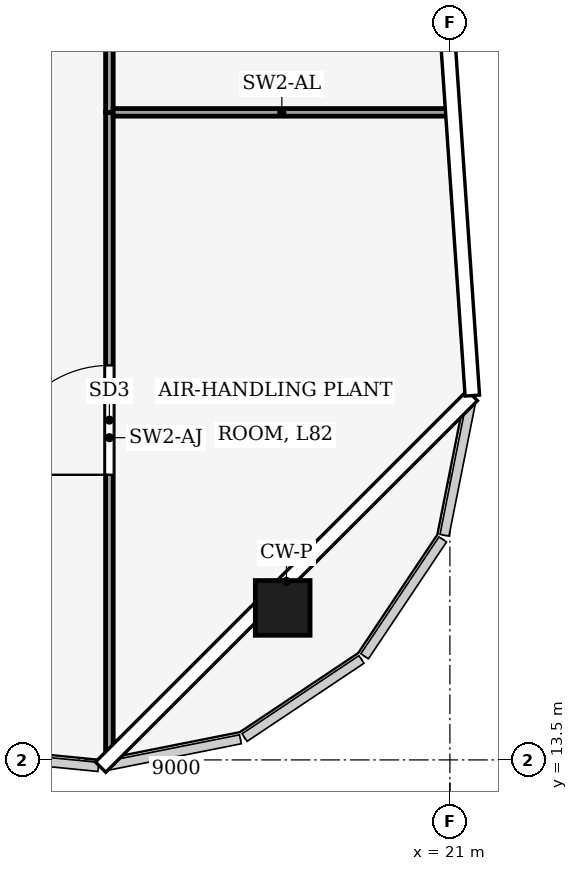
"""IFC4 building model, lengths in metres.
Left out: names, types, materials, properties, quantities, classifications, styles, units other than length and angle.
Written with IfcOpenShell. Run it as: python <this file> out.ifc"""

import sys

from ifc_helpers import new_model, si_unit, direction, frame, frame_2d, origin, origin_2d, place, context, subcontext, project, spatial, rectangle, hollow_rectangle, extrude, element, fill, save


model = new_model("IFC4")
c1 = context("Model", 3, precision=1e-05, world=origin(), true_north=direction((0.0, 1.0)))
c2 = subcontext(c1, "Body", "Model", "MODEL_VIEW")
j1 = project(units=[si_unit("LENGTHUNIT", "METRE"), si_unit("PLANEANGLEUNIT", "RADIAN")], contexts=[c1])
p1 = place(None, origin())
s1 = spatial("IfcSite", under=j1, at=p1, CompositionType="ELEMENT")
p2 = place(p1, origin())
s2 = spatial("IfcBuilding", under=s1, at=p2, CompositionType="ELEMENT")
p3 = place(p2, frame((0.0, 0.0, 364.0)))
s3 = spatial("IfcBuildingStorey", under=s2, at=p3, CompositionType="ELEMENT", Elevation=364.0)
p4 = place(p3, frame((18.25, 16.0, 0.0), z_axis=(0.0, 0.0, 1.0), x_axis=(1.0, 0.0, 0.0)))
e1 = element("IfcColumn", 1, at=p4, inside=s3, PredefinedType="COLUMN", context=c2, shape_type="SweptSolid", body=[
    extrude(hollow_rectangle(XDim=0.9, YDim=0.9, WallThickness=0.04, at=origin_2d()), origin(), (0.0, 0.0, 1.0), 4.0),
])
p5 = place(p3, frame((15.4, 13.45, 0.0), z_axis=(0.0, 0.0, 1.0), x_axis=(0.0, 1.0, 0.0)))
e2 = element("IfcWall", 2, at=p5, inside=s3, PredefinedType="PARTITIONING", context=c2, shape_type="SweptSolid", body=[
    extrude(rectangle(XDim=10.7, YDim=0.125, at=frame_2d((5.35, 0.0))), origin(), (0.0, 0.0, 1.0), 2.812),
])
p6 = place(p5, frame((4.739, 0.0, 0.0)))
e3 = element("IfcOpeningElement", 3, at=p6, cuts=e2, PredefinedType="OPENING", context=c2, shape_type="SweptSolid", body=[
    extrude(rectangle(XDim=1.8, YDim=2.4, at=frame_2d((0.9, 1.2))), frame((0.0, 0.073, 0.0), z_axis=(0.0, -1.0, 0.0), x_axis=(1.0, 0.0, 0.0)), (0.0, 0.0, 1.0), 0.145),
])
p7 = place(p3, frame((15.4, 24.15, 0.0), z_axis=(0.0, 0.0, 1.0), x_axis=(0.0, 1.0, 0.0)))
e4 = element("IfcWall", 4, at=p7, inside=s3, PredefinedType="PARTITIONING", context=c2, shape_type="SweptSolid", body=[
    extrude(rectangle(XDim=10.15, YDim=0.125, at=frame_2d((5.075, 0.0))), origin(), (0.0, 0.0, 1.0), 3.52),
])
p8 = place(p7, frame((6.9, 0.0, 0.0)))
e5 = element("IfcOpeningElement", 5, at=p8, cuts=e4, PredefinedType="OPENING", context=c2, shape_type="SweptSolid", body=[
    extrude(rectangle(XDim=1.0, YDim=2.1, at=frame_2d((0.5, 1.05))), frame((0.0, 0.073, 0.0), z_axis=(0.0, -1.0, 0.0), x_axis=(1.0, 0.0, 0.0)), (0.0, 0.0, 1.0), 0.145),
])
p9 = place(p3, frame((15.462, 24.15, 0.0), z_axis=(0.0, 0.0, 1.0), x_axis=(1.0, 0.0, 0.0)))
e6 = element("IfcWall", 6, at=p9, inside=s3, PredefinedType="PARTITIONING", context=c2, shape_type="SweptSolid", body=[
    extrude(rectangle(XDim=5.547, YDim=0.125, at=frame_2d((2.773, 0.0))), origin(), (0.0, 0.0, 1.0), 3.02),
])
p10 = place(p6, origin())
e7 = element("IfcDoor", 7, at=p10, inside=s3, OperationType="DOUBLE_DOOR_SINGLE_SWING", PredefinedType="DOOR", context=c2, shape_type="SweptSolid", body=[
    extrude(rectangle(XDim=1.8, YDim=2.4, at=frame_2d((0.9, 1.2))), frame((0.0, 0.025, 0.0), z_axis=(0.0, -1.0, 0.0), x_axis=(1.0, 0.0, 0.0)), (0.0, 0.0, 1.0), 0.05),
])
fill(e3, e7)
save(model, sys.argv[1])
